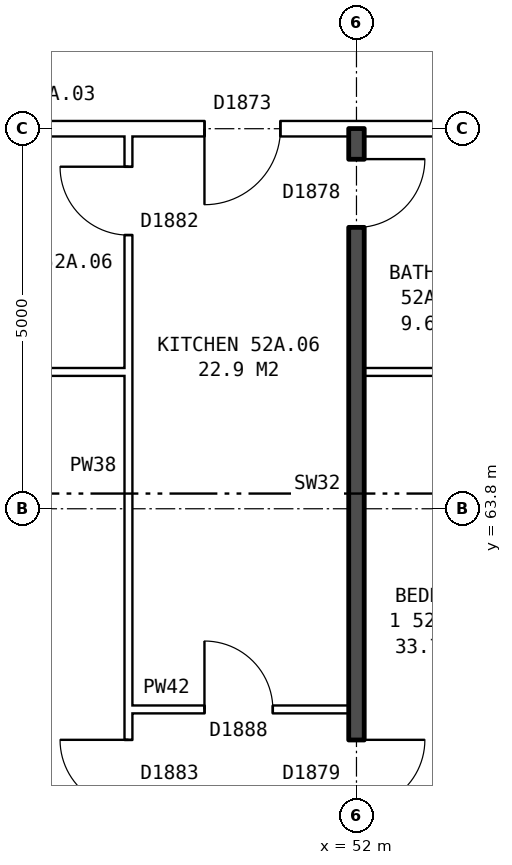
"""IFC4 building model, lengths in metres.
Left out: names, types, materials, properties, quantities, classifications, styles, units other than length and angle.
Written with IfcOpenShell. Run it as: python <this file> out.ifc"""

import sys

from ifc_helpers import new_model, si_unit, direction, frame, frame_2d, origin, place, context, subcontext, project, spatial, rectangle, extrude, element, fill, save


model = new_model("IFC4")
c1 = context("Model", 3, precision=1e-05, world=origin(), true_north=direction((0.0, 1.0)))
c2 = subcontext(c1, "Body", "Model", "MODEL_VIEW")
j1 = project(units=[si_unit("LENGTHUNIT", "METRE"), si_unit("PLANEANGLEUNIT", "RADIAN")], contexts=[c1])
p1 = place(None, origin())
s1 = spatial("IfcSite", under=j1, at=p1, CompositionType="ELEMENT")
p2 = place(p1, origin())
s2 = spatial("IfcBuilding", under=s1, at=p2, CompositionType="ELEMENT")
p3 = place(p2, frame((0.0, 0.0, 185.1)))
s3 = spatial("IfcBuildingStorey", under=s2, at=p3, CompositionType="ELEMENT", Elevation=185.1)
p4 = place(p3, frame((49.0, 61.16, 0.0), z_axis=(0.0, 0.0, 1.0), x_axis=(1.0, 0.0, 0.0)))
e1 = element("IfcWall", 1, at=p4, inside=s3, PredefinedType="PARTITIONING", context=c2, shape_type="SweptSolid", body=[
    extrude(rectangle(XDim=2.9, YDim=0.1, at=frame_2d((1.45, 0.0))), origin(), (0.0, 0.0, 1.0), 2.85),
])
p5 = place(p4, frame((1.0, 0.0, 0.0)))
e2 = element("IfcOpeningElement", 2, at=p5, cuts=e1, PredefinedType="OPENING", context=c2, shape_type="SweptSolid", body=[
    extrude(rectangle(XDim=0.9, YDim=2.1, at=frame_2d((0.45, 1.05))), frame((0.0, 0.06, 0.0), z_axis=(0.0, -1.0, 0.0), x_axis=(1.0, 0.0, 0.0)), (0.0, 0.0, 1.0), 0.12),
])
p6 = place(p3, frame((46.1, 65.6, 0.0), z_axis=(0.0, 0.0, 1.0), x_axis=(1.0, 0.0, 0.0)))
e3 = element("IfcWall", 3, at=p6, inside=s3, PredefinedType="PARTITIONING", context=c2, shape_type="SweptSolid", body=[
    extrude(rectangle(XDim=2.9, YDim=0.1, at=frame_2d((1.45, 0.0))), origin(), (0.0, 0.0, 1.0), 2.85),
])
p7 = place(p3, frame((52.1, 65.6, 0.0), z_axis=(0.0, 0.0, 1.0), x_axis=(1.0, 0.0, 0.0)))
e4 = element("IfcWall", 4, at=p7, inside=s3, PredefinedType="PARTITIONING", context=c2, shape_type="SweptSolid", body=[
    extrude(rectangle(XDim=2.8, YDim=0.1, at=frame_2d((1.4, 0.0))), origin(), (0.0, 0.0, 1.0), 2.85),
])
p8 = place(p3, frame((44.36, 68.8, 0.0), z_axis=(0.0, 0.0, 1.0), x_axis=(1.0, 0.0, 0.0)))
e5 = element("IfcWall", 5, at=p8, inside=s3, PredefinedType="PARTITIONING", context=c2, shape_type="SweptSolid", body=[
    extrude(rectangle(XDim=19.28, YDim=0.2, at=frame_2d((9.64, 0.0))), origin(), (0.0, 0.0, 1.0), 2.85),
])
p9 = place(p8, frame((14.64, 0.0, 0.0)))
e6 = element("IfcOpeningElement", 6, at=p9, cuts=e5, PredefinedType="OPENING", context=c2, shape_type="SweptSolid", body=[
    extrude(rectangle(XDim=1.0, YDim=2.1, at=frame_2d((0.5, 1.05))), frame((0.0, 0.11, 0.0), z_axis=(0.0, -1.0, 0.0), x_axis=(1.0, 0.0, 0.0)), (0.0, 0.0, 1.0), 0.22),
])
p10 = place(p8, frame((5.64, 0.0, 0.0)))
e7 = element("IfcOpeningElement", 7, at=p10, cuts=e5, PredefinedType="OPENING", context=c2, shape_type="SweptSolid", body=[
    extrude(rectangle(XDim=1.0, YDim=2.1, at=frame_2d((0.5, 1.05))), frame((0.0, 0.11, 0.0), z_axis=(0.0, -1.0, 0.0), x_axis=(1.0, 0.0, 0.0)), (0.0, 0.0, 1.0), 0.22),
])
p11 = place(p3, frame((49.0, 54.36, 0.0), z_axis=(0.0, 0.0, 1.0), x_axis=(0.0, 1.0, 0.0)))
e8 = element("IfcWall", 8, at=p11, inside=s3, PredefinedType="PARTITIONING", context=c2, shape_type="SweptSolid", body=[
    extrude(rectangle(XDim=14.34, YDim=0.1, at=frame_2d((7.17, 0.0))), origin(), (0.0, 0.0, 1.0), 2.85),
])
p12 = place(p11, frame((5.5, 0.0, 0.0)))
e9 = element("IfcOpeningElement", 9, at=p12, cuts=e8, PredefinedType="OPENING", context=c2, shape_type="SweptSolid", body=[
    extrude(rectangle(XDim=0.9, YDim=2.1, at=frame_2d((0.45, 1.05))), frame((0.0, 0.06, 0.0), z_axis=(0.0, -1.0, 0.0), x_axis=(1.0, 0.0, 0.0)), (0.0, 0.0, 1.0), 0.12),
])
p13 = place(p11, frame((13.04, 0.0, 0.0)))
e10 = element("IfcOpeningElement", 10, at=p13, cuts=e8, PredefinedType="OPENING", context=c2, shape_type="SweptSolid", body=[
    extrude(rectangle(XDim=0.9, YDim=2.1, at=frame_2d((0.45, 1.05))), frame((0.0, 0.06, 0.0), z_axis=(0.0, -1.0, 0.0), x_axis=(1.0, 0.0, 0.0)), (0.0, 0.0, 1.0), 0.12),
])
p14 = place(p3, frame((52.0, 54.36, 0.0), z_axis=(0.0, 0.0, 1.0), x_axis=(0.0, 1.0, 0.0)))
e11 = element("IfcWall", 11, at=p14, inside=s3, PredefinedType="SOLIDWALL", context=c2, shape_type="SweptSolid", body=[
    extrude(rectangle(XDim=14.44, YDim=0.2, at=frame_2d((7.22, 0.0))), origin(), (0.0, 0.0, 1.0), 2.85),
])
p15 = place(p14, frame((5.5, 0.0, 0.0)))
e12 = element("IfcOpeningElement", 12, at=p15, cuts=e11, PredefinedType="OPENING", context=c2, shape_type="SweptSolid", body=[
    extrude(rectangle(XDim=0.9, YDim=2.1, at=frame_2d((0.45, 1.05))), frame((0.0, 0.11, 0.0), z_axis=(0.0, -1.0, 0.0), x_axis=(1.0, 0.0, 0.0)), (0.0, 0.0, 1.0), 0.22),
])
p16 = place(p14, frame((13.14, 0.0, 0.0)))
e13 = element("IfcOpeningElement", 13, at=p16, cuts=e11, PredefinedType="OPENING", context=c2, shape_type="SweptSolid", body=[
    extrude(rectangle(XDim=0.9, YDim=2.1, at=frame_2d((0.45, 1.05))), frame((0.0, 0.11, 0.0), z_axis=(0.0, -1.0, 0.0), x_axis=(1.0, 0.0, 0.0)), (0.0, 0.0, 1.0), 0.22),
])
p17 = place(p15, frame((0.9, 0.0, 0.0), z_axis=(0.0, 0.0, 1.0), x_axis=(-1.0, 0.0, 0.0)))
e14 = element("IfcDoor", 14, at=p17, inside=s3, OperationType="SINGLE_SWING_LEFT", PredefinedType="DOOR", context=c2, shape_type="SweptSolid", body=[
    extrude(rectangle(XDim=0.9, YDim=2.1, at=frame_2d((0.45, 1.05))), frame((0.0, 0.025, 0.0), z_axis=(0.0, -1.0, 0.0), x_axis=(1.0, 0.0, 0.0)), (0.0, 0.0, 1.0), 0.05),
])
fill(e12, e14)
p18 = place(p12, origin())
e15 = element("IfcDoor", 15, at=p18, inside=s3, OperationType="SINGLE_SWING_RIGHT", PredefinedType="DOOR", context=c2, shape_type="SweptSolid", body=[
    extrude(rectangle(XDim=0.9, YDim=2.1, at=frame_2d((0.45, 1.05))), frame((0.0, 0.025, 0.0), z_axis=(0.0, -1.0, 0.0), x_axis=(1.0, 0.0, 0.0)), (0.0, 0.0, 1.0), 0.05),
])
fill(e9, e15)
p19 = place(p10, frame((1.0, 0.0, 0.0), z_axis=(0.0, 0.0, 1.0), x_axis=(-1.0, 0.0, 0.0)))
e16 = element("IfcDoor", 16, at=p19, inside=s3, OperationType="SINGLE_SWING_RIGHT", PredefinedType="DOOR", context=c2, shape_type="SweptSolid", body=[
    extrude(rectangle(XDim=1.0, YDim=2.1, at=frame_2d((0.5, 1.05))), frame((0.0, 0.025, 0.0), z_axis=(0.0, -1.0, 0.0), x_axis=(1.0, 0.0, 0.0)), (0.0, 0.0, 1.0), 0.05),
])
fill(e7, e16)
p20 = place(p5, origin())
e17 = element("IfcDoor", 17, at=p20, inside=s3, OperationType="SINGLE_SWING_LEFT", PredefinedType="DOOR", context=c2, shape_type="SweptSolid", body=[
    extrude(rectangle(XDim=0.9, YDim=2.1, at=frame_2d((0.45, 1.05))), frame((0.0, 0.025, 0.0), z_axis=(0.0, -1.0, 0.0), x_axis=(1.0, 0.0, 0.0)), (0.0, 0.0, 1.0), 0.05),
])
fill(e2, e17)
p21 = place(p16, frame((0.9, 0.0, 0.0), z_axis=(0.0, 0.0, 1.0), x_axis=(-1.0, 0.0, 0.0)))
e18 = element("IfcDoor", 18, at=p21, inside=s3, OperationType="SINGLE_SWING_LEFT", PredefinedType="DOOR", context=c2, shape_type="SweptSolid", body=[
    extrude(rectangle(XDim=0.9, YDim=2.1, at=frame_2d((0.45, 1.05))), frame((0.0, 0.025, 0.0), z_axis=(0.0, -1.0, 0.0), x_axis=(1.0, 0.0, 0.0)), (0.0, 0.0, 1.0), 0.05),
])
fill(e13, e18)
p22 = place(p13, origin())
e19 = element("IfcDoor", 19, at=p22, inside=s3, OperationType="SINGLE_SWING_RIGHT", PredefinedType="DOOR", context=c2, shape_type="SweptSolid", body=[
    extrude(rectangle(XDim=0.9, YDim=2.1, at=frame_2d((0.45, 1.05))), frame((0.0, 0.025, 0.0), z_axis=(0.0, -1.0, 0.0), x_axis=(1.0, 0.0, 0.0)), (0.0, 0.0, 1.0), 0.05),
])
fill(e10, e19)
save(model, sys.argv[1])
